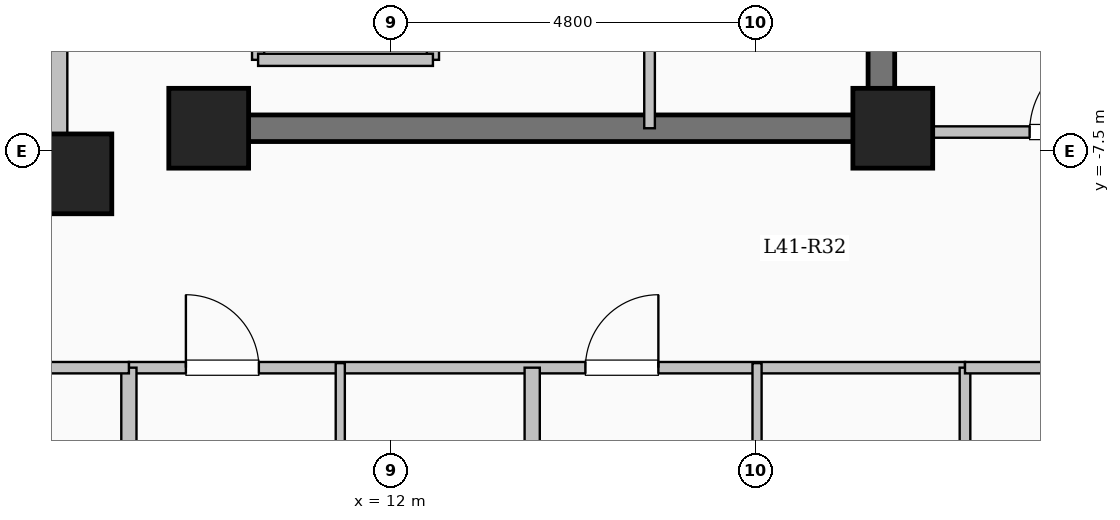
"""IFC4 building model, lengths in metres.
Left out: names, types, materials, properties, quantities, classifications, styles, units other than length and angle.
Written with IfcOpenShell. Run it as: python <this file> out.ifc"""

import sys

from ifc_helpers import new_model, si_unit, direction, frame, frame_2d, origin, origin_2d, place, context, subcontext, project, spatial, rectangle, extrude, element, fill, save


model = new_model("IFC4")
c1 = context("Model", 3, precision=1e-05, world=origin(), true_north=direction((0.0, 1.0)))
c2 = subcontext(c1, "Body", "Model", "MODEL_VIEW")
j1 = project(units=[si_unit("LENGTHUNIT", "METRE"), si_unit("PLANEANGLEUNIT", "RADIAN")], contexts=[c1])
p1 = place(None, origin())
s1 = spatial("IfcSite", under=j1, at=p1, CompositionType="ELEMENT")
p2 = place(p1, origin())
s2 = spatial("IfcBuilding", under=s1, at=p2, CompositionType="ELEMENT")
p3 = place(p2, frame((0.0, 0.0, 152.7)))
s3 = spatial("IfcBuildingStorey", under=s2, at=p3, CompositionType="ELEMENT", Elevation=152.7)
for number, where, z_axis, x_axis in (
    (1, (7.8, -7.8, 0.0), (0.0, 0.0, 1.0), (1.0, 0.0, 0.0)),
    (2, (9.6, -7.2, 0.0), (0.0, 0.0, 1.0), (1.0, 0.0, 0.0)),
    (3, (18.6, -7.2, 0.0), (0.0, 0.0, 1.0), (1.0, 0.0, 0.0)),
):
    element("IfcColumn", number, at=place(p3, frame(where, z_axis=z_axis, x_axis=x_axis)), inside=s3, PredefinedType="COLUMN", context=c2, shape_type="SweptSolid", body=[
        extrude(rectangle(XDim=1.05, YDim=1.05, at=origin_2d()), origin(), (0.0, 0.0, 1.0), 3.35),
    ])
p4 = place(p3, frame((-7.62, -7.62, 0.0), z_axis=(0.0, 0.0, 1.0), x_axis=(1.0, 0.0, 0.0)))
e4 = element("IfcWall", 4, at=p4, inside=s3, PredefinedType="SOLIDWALL", context=c2, shape_type="SweptSolid", body=[
    extrude(rectangle(XDim=15.24, YDim=0.24, at=frame_2d((7.62, 0.0))), origin(), (0.0, 0.0, 1.0), 3.1),
])
p5 = place(p4, frame((6.92, 0.0, 0.95)))
e5 = element("IfcOpeningElement", 5, at=p5, cuts=e4, PredefinedType="OPENING", context=c2, shape_type="SweptSolid", body=[
    extrude(rectangle(XDim=1.4, YDim=1.5, at=frame_2d((0.7, 0.75))), frame((0.0, 0.13, 0.0), z_axis=(0.0, -1.0, 0.0), x_axis=(1.0, 0.0, 0.0)), (0.0, 0.0, 1.0), 0.26),
])
p6 = place(p3, frame((7.62, -7.62, 0.0), z_axis=(0.0, 0.0, 1.0), x_axis=(0.0, 1.0, 0.0)))
e6 = element("IfcWall", 6, at=p6, inside=s3, PredefinedType="SOLIDWALL", context=c2, shape_type="SweptSolid", body=[
    extrude(rectangle(XDim=15.24, YDim=0.24, at=frame_2d((7.62, 0.0))), origin(), (0.0, 0.0, 1.0), 3.1),
])
p7 = place(p6, frame((6.92, 0.0, 0.95)))
e7 = element("IfcOpeningElement", 7, at=p7, cuts=e6, PredefinedType="OPENING", context=c2, shape_type="SweptSolid", body=[
    extrude(rectangle(XDim=1.4, YDim=1.5, at=frame_2d((0.7, 0.75))), frame((0.0, 0.13, 0.0), z_axis=(0.0, -1.0, 0.0), x_axis=(1.0, 0.0, 0.0)), (0.0, 0.0, 1.0), 0.26),
])
p8 = place(p3, frame((10.25, -6.3, 0.0), z_axis=(0.0, 0.0, 1.0), x_axis=(0.0, 1.0, 0.0)))
e8 = element("IfcWall", 8, at=p8, inside=s3, PredefinedType="SOLIDWALL", context=c2, shape_type="SweptSolid", body=[
    extrude(rectangle(XDim=2.6, YDim=0.16, at=frame_2d((1.3, 0.0))), origin(), (0.0, 0.0, 1.0), 3.1),
])
p9 = place(p8, frame((0.75, 0.0, 0.0)))
e9 = element("IfcOpeningElement", 9, at=p9, cuts=e8, PredefinedType="OPENING", context=c2, shape_type="SweptSolid", body=[
    extrude(rectangle(XDim=1.1, YDim=2.15, at=frame_2d((0.55, 1.075))), frame((0.0, 0.09, 0.0), z_axis=(0.0, -1.0, 0.0), x_axis=(1.0, 0.0, 0.0)), (0.0, 0.0, 1.0), 0.18),
])
p10 = place(p3, frame((12.55, -6.3, 0.0), z_axis=(0.0, 0.0, 1.0), x_axis=(0.0, 1.0, 0.0)))
e10 = element("IfcWall", 10, at=p10, inside=s3, PredefinedType="SOLIDWALL", context=c2, shape_type="SweptSolid", body=[
    extrude(rectangle(XDim=2.6, YDim=0.16, at=frame_2d((1.3, 0.0))), origin(), (0.0, 0.0, 1.0), 3.1),
])
p11 = place(p3, frame((10.25, -6.3, 0.0), z_axis=(0.0, 0.0, 1.0), x_axis=(1.0, 0.0, 0.0)))
e11 = element("IfcWall", 11, at=p11, inside=s3, PredefinedType="SOLIDWALL", context=c2, shape_type="SweptSolid", body=[
    extrude(rectangle(XDim=2.3, YDim=0.16, at=frame_2d((1.15, 0.0))), origin(), (0.0, 0.0, 1.0), 3.1),
])
p12 = place(p3, frame((18.45, -7.375, 0.0), z_axis=(0.0, 0.0, 1.0), x_axis=(0.0, 1.0, 0.0)))
e12 = element("IfcWall", 12, at=p12, inside=s3, PredefinedType="SHEAR", context=c2, shape_type="SweptSolid", body=[
    extrude(rectangle(XDim=14.05, YDim=0.35, at=frame_2d((7.025, 0.0))), origin(), (0.0, 0.0, 1.0), 3.35),
])
p13 = place(p3, frame((10.075, -7.2, 0.0), z_axis=(0.0, 0.0, 1.0), x_axis=(1.0, 0.0, 0.0)))
e13 = element("IfcWall", 13, at=p13, inside=s3, PredefinedType="SHEAR", context=c2, shape_type="SweptSolid", body=[
    extrude(rectangle(XDim=8.55, YDim=0.35, at=frame_2d((4.275, 0.0))), origin(), (0.0, 0.0, 1.0), 3.35),
])
p14 = place(p3, frame((15.4, -7.2, 0.0), z_axis=(0.0, 0.0, 1.0), x_axis=(0.0, 1.0, 0.0)))
e14 = element("IfcWall", 14, at=p14, inside=s3, PredefinedType="PARTITIONING", context=c2, shape_type="SweptSolid", body=[
    extrude(rectangle(XDim=10.45, YDim=0.14, at=frame_2d((5.225, 0.0))), origin(), (0.0, 0.0, 1.0), 3.1),
])
p15 = place(p14, frame((9.25, 0.0, 0.0)))
e15 = element("IfcOpeningElement", 15, at=p15, cuts=e14, PredefinedType="OPENING", context=c2, shape_type="SweptSolid", body=[
    extrude(rectangle(XDim=0.9, YDim=2.08, at=frame_2d((0.45, 1.04))), frame((0.0, 0.08, 0.0), z_axis=(0.0, -1.0, 0.0), x_axis=(1.0, 0.0, 0.0)), (0.0, 0.0, 1.0), 0.16),
])
p16 = place(p3, frame((8.55, -10.35, 0.0), z_axis=(0.0, 0.0, 1.0), x_axis=(1.0, 0.0, 0.0)))
e16 = element("IfcWall", 16, at=p16, inside=s3, PredefinedType="PARTITIONING", context=c2, shape_type="SweptSolid", body=[
    extrude(rectangle(XDim=11.0, YDim=0.15, at=frame_2d((5.5, 0.0))), origin(), (0.0, 0.0, 1.0), 3.1),
])
p17 = place(p16, frame((0.75, 0.0, 0.0)))
e17 = element("IfcOpeningElement", 17, at=p17, cuts=e16, PredefinedType="OPENING", context=c2, shape_type="SweptSolid", body=[
    extrude(rectangle(XDim=0.96, YDim=2.15, at=frame_2d((0.48, 1.075))), frame((0.0, 0.085, 0.0), z_axis=(0.0, -1.0, 0.0), x_axis=(1.0, 0.0, 0.0)), (0.0, 0.0, 1.0), 0.17),
])
p18 = place(p16, frame((6.006, 0.0, 0.0)))
e18 = element("IfcOpeningElement", 18, at=p18, cuts=e16, PredefinedType="OPENING", context=c2, shape_type="SweptSolid", body=[
    extrude(rectangle(XDim=0.96, YDim=2.15, at=frame_2d((0.48, 1.075))), frame((0.0, 0.085, 0.0), z_axis=(0.0, -1.0, 0.0), x_axis=(1.0, 0.0, 0.0)), (0.0, 0.0, 1.0), 0.17),
])
p19 = place(p3, frame((13.856, -21.2, 0.0), z_axis=(0.0, 0.0, 1.0), x_axis=(0.0, 1.0, 0.0)))
e19 = element("IfcWall", 19, at=p19, inside=s3, PredefinedType="SOLIDWALL", context=c2, shape_type="SweptSolid", body=[
    extrude(rectangle(XDim=10.85, YDim=0.2, at=frame_2d((5.425, 0.0))), origin(), (0.0, 0.0, 1.0), 3.1),
])
p20 = place(p3, frame((11.331, -13.51, 0.0), z_axis=(0.0, 0.0, 1.0), x_axis=(0.0, 1.0, 0.0)))
e20 = element("IfcWall", 20, at=p20, inside=s3, PredefinedType="PARTITIONING", context=c2, shape_type="SweptSolid", body=[
    extrude(rectangle(XDim=3.22, YDim=0.12, at=frame_2d((1.61, 0.0))), origin(), (0.0, 0.0, 1.0), 3.1),
])
p21 = place(p20, frame((1.14, 0.0, 0.0)))
e21 = element("IfcOpeningElement", 21, at=p21, cuts=e20, PredefinedType="OPENING", context=c2, shape_type="SweptSolid", body=[
    extrude(rectangle(XDim=0.88, YDim=2.1, at=frame_2d((0.44, 1.05))), frame((0.0, 0.07, 0.0), z_axis=(0.0, -1.0, 0.0), x_axis=(1.0, 0.0, 0.0)), (0.0, 0.0, 1.0), 0.14),
])
p22 = place(p3, frame((16.814, -13.51, 0.0), z_axis=(0.0, 0.0, 1.0), x_axis=(0.0, 1.0, 0.0)))
e22 = element("IfcWall", 22, at=p22, inside=s3, PredefinedType="PARTITIONING", context=c2, shape_type="SweptSolid", body=[
    extrude(rectangle(XDim=3.22, YDim=0.12, at=frame_2d((1.61, 0.0))), origin(), (0.0, 0.0, 1.0), 3.1),
])
p23 = place(p22, frame((1.14, 0.0, 0.0)))
e23 = element("IfcOpeningElement", 23, at=p23, cuts=e22, PredefinedType="OPENING", context=c2, shape_type="SweptSolid", body=[
    extrude(rectangle(XDim=0.88, YDim=2.1, at=frame_2d((0.44, 1.05))), frame((0.0, 0.07, 0.0), z_axis=(0.0, -1.0, 0.0), x_axis=(1.0, 0.0, 0.0)), (0.0, 0.0, 1.0), 0.14),
])
p24 = place(p3, frame((8.55, -21.804, 0.0), z_axis=(0.0, 0.0, 1.0), x_axis=(0.0, 1.0, 0.0)))
e24 = element("IfcWall", 24, at=p24, inside=s3, PredefinedType="SOLIDWALL", context=c2, shape_type="SweptSolid", body=[
    extrude(rectangle(XDim=11.454, YDim=0.2, at=frame_2d((5.727, 0.0))), origin(), (0.0, 0.0, 1.0), 3.1),
])
p25 = place(p3, frame((-8.55, -10.35, 0.0), z_axis=(0.0, 0.0, 1.0), x_axis=(1.0, 0.0, 0.0)))
e25 = element("IfcWall", 25, at=p25, inside=s3, PredefinedType="PARTITIONING", context=c2, shape_type="SweptSolid", body=[
    extrude(rectangle(XDim=17.1, YDim=0.15, at=frame_2d((8.55, 0.0))), origin(), (0.0, 0.0, 1.0), 3.1),
])
p26 = place(p25, frame((1.6, 0.0, 0.0)))
e26 = element("IfcOpeningElement", 26, at=p26, cuts=e25, PredefinedType="OPENING", context=c2, shape_type="SweptSolid", body=[
    extrude(rectangle(XDim=0.95, YDim=2.15, at=frame_2d((0.475, 1.075))), frame((0.0, 0.085, 0.0), z_axis=(0.0, -1.0, 0.0), x_axis=(1.0, 0.0, 0.0)), (0.0, 0.0, 1.0), 0.17),
])
p27 = place(p25, frame((10.5, 0.0, 0.0)))
e27 = element("IfcOpeningElement", 27, at=p27, cuts=e25, PredefinedType="OPENING", context=c2, shape_type="SweptSolid", body=[
    extrude(rectangle(XDim=0.95, YDim=2.15, at=frame_2d((0.475, 1.075))), frame((0.0, 0.085, 0.0), z_axis=(0.0, -1.0, 0.0), x_axis=(1.0, 0.0, 0.0)), (0.0, 0.0, 1.0), 0.17),
])
p28 = place(p3, frame((18.45, -7.25, 0.0), z_axis=(0.0, 0.0, 1.0), x_axis=(1.0, 0.0, 0.0)))
e28 = element("IfcWall", 28, at=p28, inside=s3, PredefinedType="PARTITIONING", context=c2, shape_type="SweptSolid", body=[
    extrude(rectangle(XDim=6.63, YDim=0.15, at=frame_2d((3.315, 0.0))), origin(), (0.0, 0.0, 1.0), 3.1),
])
p29 = place(p28, frame((1.95, 0.0, 0.0)))
e29 = element("IfcOpeningElement", 29, at=p29, cuts=e28, PredefinedType="OPENING", context=c2, shape_type="SweptSolid", body=[
    extrude(rectangle(XDim=1.08, YDim=2.15, at=frame_2d((0.54, 1.075))), frame((0.0, 0.085, 0.0), z_axis=(0.0, -1.0, 0.0), x_axis=(1.0, 0.0, 0.0)), (0.0, 0.0, 1.0), 0.17),
])
p30 = place(p3, frame((19.55, -17.25, 0.0), z_axis=(0.0, 0.0, 1.0), x_axis=(0.0, 1.0, 0.0)))
e30 = element("IfcWall", 30, at=p30, inside=s3, PredefinedType="PARTITIONING", context=c2, shape_type="SweptSolid", body=[
    extrude(rectangle(XDim=6.9, YDim=0.14, at=frame_2d((3.45, 0.0))), origin(), (0.0, 0.0, 1.0), 3.1),
])
p31 = place(p3, frame((19.55, -10.35, 0.0), z_axis=(0.0, 0.0, 1.0), x_axis=(1.0, 0.0, 0.0)))
e31 = element("IfcWall", 31, at=p31, inside=s3, PredefinedType="PARTITIONING", context=c2, shape_type="SweptSolid", body=[
    extrude(rectangle(XDim=5.53, YDim=0.15, at=frame_2d((2.765, 0.0))), origin(), (0.0, 0.0, 1.0), 3.1),
])
p32 = place(p31, frame((2.29, 0.0, 0.0)))
e32 = element("IfcOpeningElement", 32, at=p32, cuts=e31, PredefinedType="OPENING", context=c2, shape_type="SweptSolid", body=[
    extrude(rectangle(XDim=0.95, YDim=2.15, at=frame_2d((0.475, 1.075))), frame((0.0, 0.085, 0.0), z_axis=(0.0, -1.0, 0.0), x_axis=(1.0, 0.0, 0.0)), (0.0, 0.0, 1.0), 0.17),
])
p33 = place(p17, origin())
e33 = element("IfcDoor", 33, at=p33, inside=s3, OperationType="SINGLE_SWING_LEFT", PredefinedType="DOOR", context=c2, shape_type="SweptSolid", body=[
    extrude(rectangle(XDim=0.96, YDim=2.15, at=frame_2d((0.48, 1.075))), frame((0.0, 0.025, 0.0), z_axis=(0.0, -1.0, 0.0), x_axis=(1.0, 0.0, 0.0)), (0.0, 0.0, 1.0), 0.05),
])
fill(e17, e33)
p34 = place(p18, origin())
e34 = element("IfcDoor", 34, at=p34, inside=s3, OperationType="SINGLE_SWING_RIGHT", PredefinedType="DOOR", context=c2, shape_type="SweptSolid", body=[
    extrude(rectangle(XDim=0.96, YDim=2.15, at=frame_2d((0.48, 1.075))), frame((0.0, 0.025, 0.0), z_axis=(0.0, -1.0, 0.0), x_axis=(1.0, 0.0, 0.0)), (0.0, 0.0, 1.0), 0.05),
])
fill(e18, e34)
p35 = place(p29, origin())
e35 = element("IfcDoor", 35, at=p35, inside=s3, OperationType="SINGLE_SWING_RIGHT", PredefinedType="DOOR", context=c2, shape_type="SweptSolid", body=[
    extrude(rectangle(XDim=1.08, YDim=2.15, at=frame_2d((0.54, 1.075))), frame((0.0, 0.025, 0.0), z_axis=(0.0, -1.0, 0.0), x_axis=(1.0, 0.0, 0.0)), (0.0, 0.0, 1.0), 0.05),
])
fill(e29, e35)
save(model, sys.argv[1])
